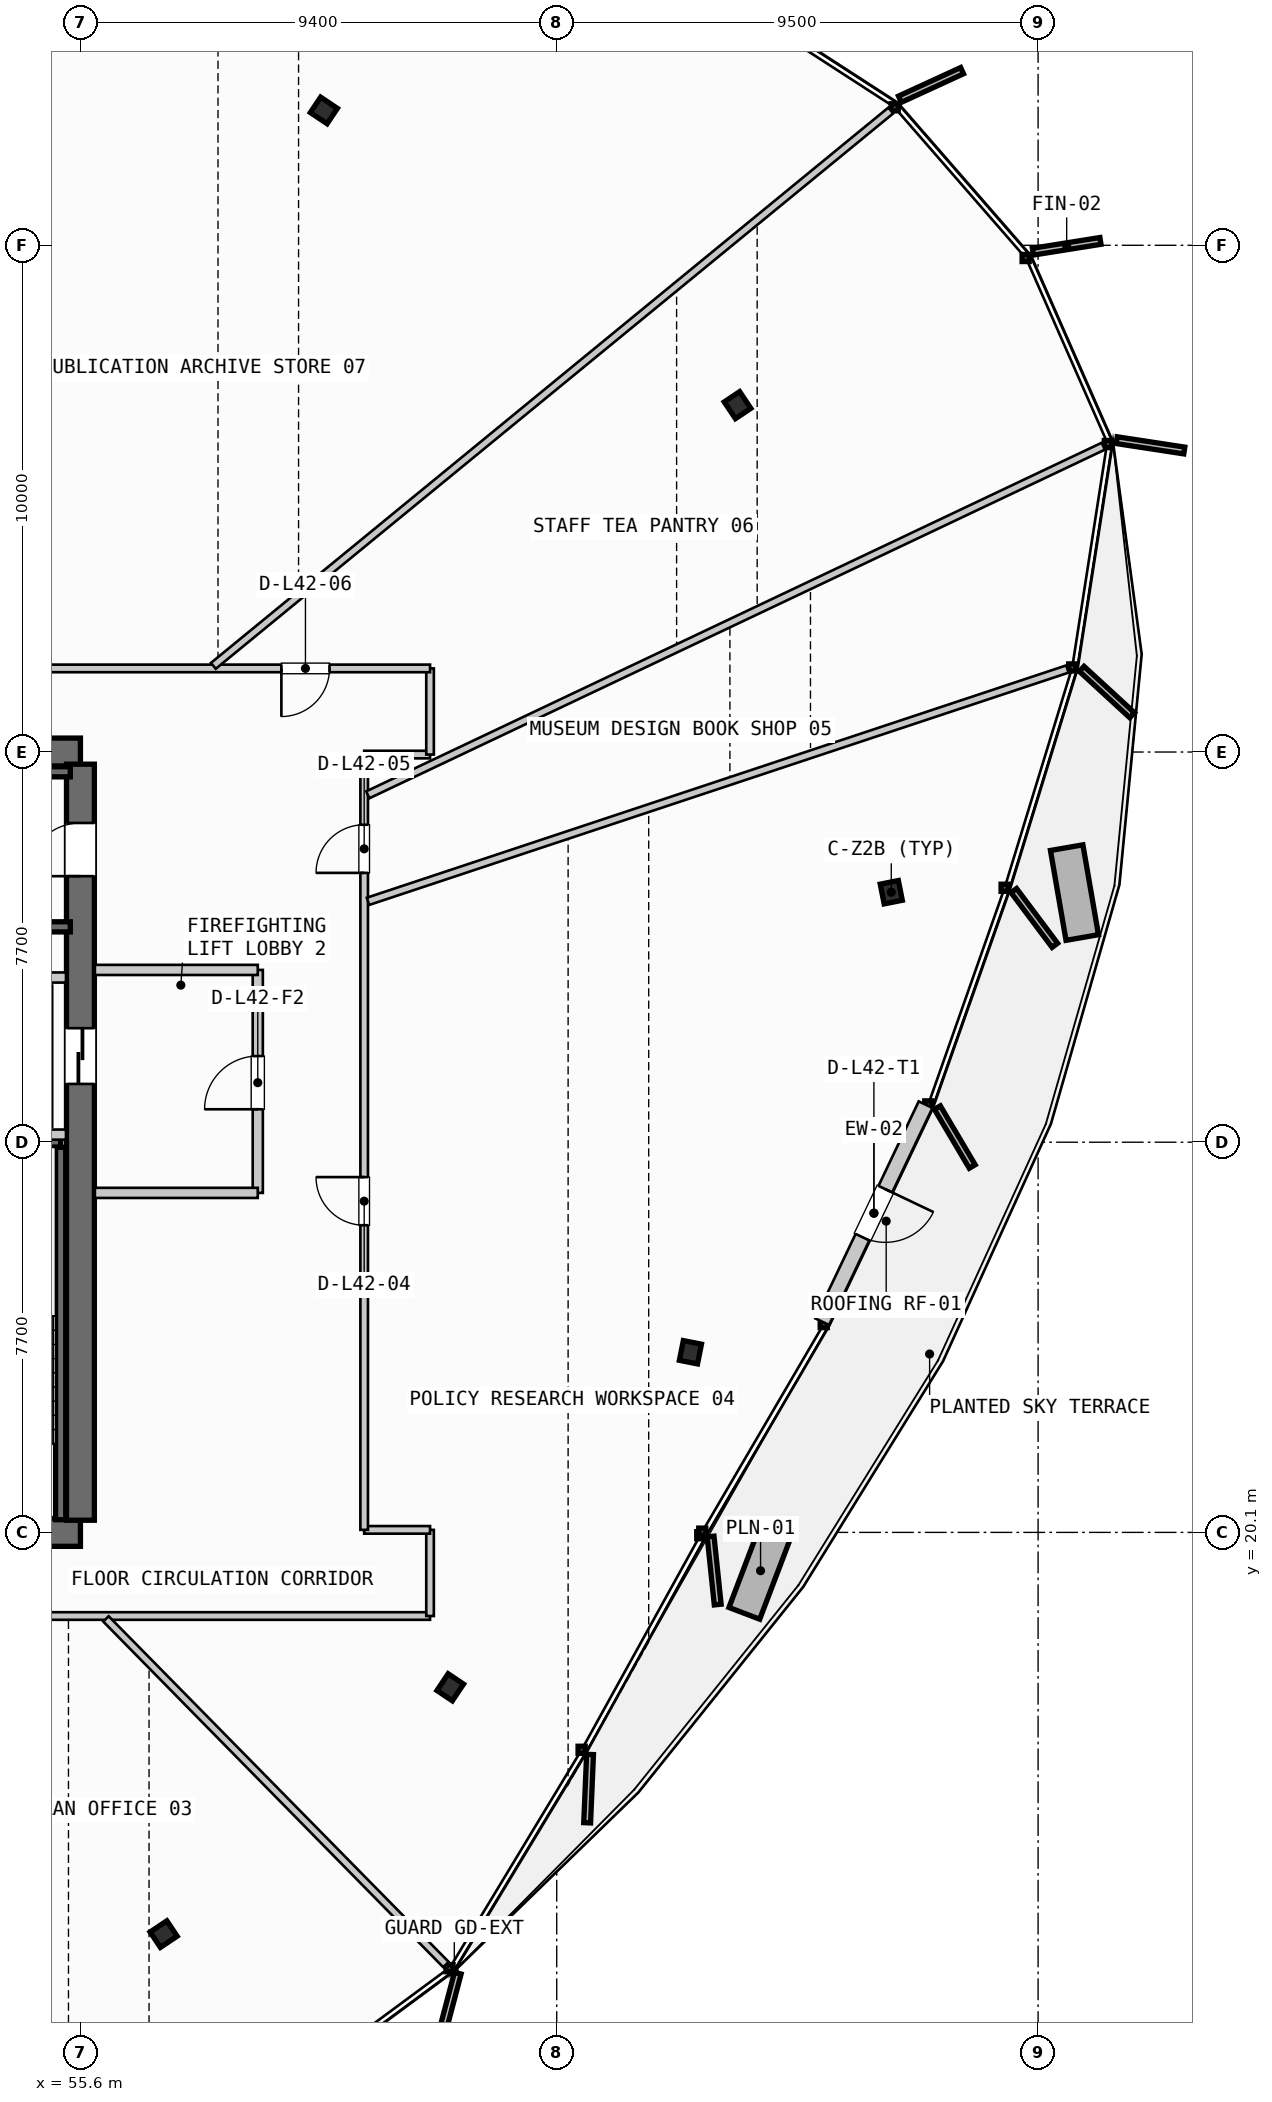
"""IFC4 building model, lengths in metres.
Left out: names, types, materials, properties, quantities, classifications, styles, units other than length and angle.
Written with IfcOpenShell. Run it as: python <this file> out.ifc"""

import sys

from ifc_helpers import new_model, si_unit, direction, frame, frame_2d, origin, origin_2d, place, context, subcontext, project, spatial, rectangle, i_section, extrude, source, transform, mapped, element, fill, save


model = new_model("IFC4")
c1 = context("Model", 3, precision=1e-05, world=origin(), true_north=direction((0.0, 1.0)))
c2 = subcontext(c1, "Body", "Model", "MODEL_VIEW")
j1 = project(units=[si_unit("LENGTHUNIT", "METRE"), si_unit("PLANEANGLEUNIT", "RADIAN")], contexts=[c1])
p1 = place(None, origin())
s1 = spatial("IfcSite", under=j1, at=p1, CompositionType="ELEMENT")
p2 = place(p1, origin())
s2 = spatial("IfcBuilding", under=s1, at=p2, CompositionType="ELEMENT")
p3 = place(p2, frame((0.0, 0.0, 164.3)))
s3 = spatial("IfcBuildingStorey", under=s2, at=p3, CompositionType="ELEMENT", Elevation=164.3)
p4 = place(p3, frame((38.0, 20.1, 0.0), z_axis=(0.0, 0.0, 1.0), x_axis=(1.0, 0.0, 0.0)))
e1 = element("IfcWall", 1, at=p4, inside=s3, PredefinedType="SHEAR", context=c2, shape_type="SweptSolid", body=[
    extrude(rectangle(XDim=17.6, YDim=0.55, at=frame_2d((8.8, 0.0))), origin(), (0.0, 0.0, 1.0), 3.3),
])
p5 = place(p4, frame((1.4, 0.0, 0.0)))
e2 = element("IfcOpeningElement", 2, at=p5, cuts=e1, PredefinedType="OPENING", context=c2, shape_type="SweptSolid", body=[
    extrude(rectangle(XDim=1.05, YDim=2.15, at=frame_2d((0.525, 1.075))), frame((0.0, 0.285, 0.0), z_axis=(0.0, -1.0, 0.0), x_axis=(1.0, 0.0, 0.0)), (0.0, 0.0, 1.0), 0.57),
])
p6 = place(p4, frame((15.15, 0.0, 0.0)))
e3 = element("IfcOpeningElement", 3, at=p6, cuts=e1, PredefinedType="OPENING", context=c2, shape_type="SweptSolid", body=[
    extrude(rectangle(XDim=1.05, YDim=2.15, at=frame_2d((0.525, 1.075))), frame((0.0, 0.285, 0.0), z_axis=(0.0, -1.0, 0.0), x_axis=(1.0, 0.0, 0.0)), (0.0, 0.0, 1.0), 0.57),
])
p7 = place(p4, frame((5.25, 0.0, 0.0)))
e4 = element("IfcOpeningElement", 4, at=p7, cuts=e1, PredefinedType="OPENING", context=c2, shape_type="SweptSolid", body=[
    extrude(rectangle(XDim=0.95, YDim=2.15, at=frame_2d((0.475, 1.075))), frame((0.0, 0.285, 0.0), z_axis=(0.0, -1.0, 0.0), x_axis=(1.0, 0.0, 0.0)), (0.0, 0.0, 1.0), 0.57),
])
p8 = place(p4, frame((11.4, 0.0, 0.0)))
e5 = element("IfcOpeningElement", 5, at=p8, cuts=e1, PredefinedType="OPENING", context=c2, shape_type="SweptSolid", body=[
    extrude(rectangle(XDim=0.95, YDim=2.15, at=frame_2d((0.475, 1.075))), frame((0.0, 0.285, 0.0), z_axis=(0.0, -1.0, 0.0), x_axis=(1.0, 0.0, 0.0)), (0.0, 0.0, 1.0), 0.57),
])
p9 = place(p3, frame((55.6, 35.5, 0.0), z_axis=(0.0, 0.0, 1.0), x_axis=(-1.0, 0.0, 0.0)))
e6 = element("IfcWall", 6, at=p9, inside=s3, PredefinedType="SHEAR", context=c2, shape_type="SweptSolid", body=[
    extrude(rectangle(XDim=17.6, YDim=0.55, at=frame_2d((8.8, 0.0))), origin(), (0.0, 0.0, 1.0), 3.3),
])
p10 = place(p9, frame((8.05, 0.0, 0.0)))
e7 = element("IfcOpeningElement", 7, at=p10, cuts=e6, PredefinedType="OPENING", context=c2, shape_type="SweptSolid", body=[
    extrude(rectangle(XDim=1.5, YDim=2.2, at=frame_2d((0.75, 1.1))), frame((0.0, 0.285, 0.0), z_axis=(0.0, -1.0, 0.0), x_axis=(1.0, 0.0, 0.0)), (0.0, 0.0, 1.0), 0.57),
])
p11 = place(p9, frame((14.95, 0.0, 0.0)))
e8 = element("IfcOpeningElement", 8, at=p11, cuts=e6, PredefinedType="OPENING", context=c2, shape_type="SweptSolid", body=[
    extrude(rectangle(XDim=1.4, YDim=2.3, at=frame_2d((0.7, 1.15))), frame((0.0, 0.285, 0.0), z_axis=(0.0, -1.0, 0.0), x_axis=(1.0, 0.0, 0.0)), (0.0, 0.0, 1.0), 0.57),
])
p12 = place(p9, frame((12.3, 0.0, 0.0)))
e9 = element("IfcOpeningElement", 9, at=p12, cuts=e6, PredefinedType="OPENING", context=c2, shape_type="SweptSolid", body=[
    extrude(rectangle(XDim=0.95, YDim=2.15, at=frame_2d((0.475, 1.075))), frame((0.0, 0.285, 0.0), z_axis=(0.0, -1.0, 0.0), x_axis=(1.0, 0.0, 0.0)), (0.0, 0.0, 1.0), 0.57),
])
p13 = place(p9, frame((10.2, 0.0, 0.0)))
e10 = element("IfcOpeningElement", 10, at=p13, cuts=e6, PredefinedType="OPENING", context=c2, shape_type="SweptSolid", body=[
    extrude(rectangle(XDim=0.9, YDim=2.15, at=frame_2d((0.45, 1.075))), frame((0.0, 0.285, 0.0), z_axis=(0.0, -1.0, 0.0), x_axis=(1.0, 0.0, 0.0)), (0.0, 0.0, 1.0), 0.57),
])
p14 = place(p3, frame((55.6, 20.34, 0.0), z_axis=(0.0, 0.0, 1.0), x_axis=(0.0, 1.0, 0.0)))
e11 = element("IfcWall", 11, at=p14, inside=s3, PredefinedType="SHEAR", context=c2, shape_type="SweptSolid", body=[
    extrude(rectangle(XDim=14.92, YDim=0.55, at=frame_2d((7.46, 0.0))), origin(), (0.0, 0.0, 1.0), 3.3),
])
p15 = place(p14, frame((12.71, 0.0, 0.0)))
e12 = element("IfcOpeningElement", 12, at=p15, cuts=e11, PredefinedType="OPENING", context=c2, shape_type="SweptSolid", body=[
    extrude(rectangle(XDim=1.05, YDim=2.15, at=frame_2d((0.525, 1.075))), frame((0.0, 0.285, 0.0), z_axis=(0.0, -1.0, 0.0), x_axis=(1.0, 0.0, 0.0)), (0.0, 0.0, 1.0), 0.57),
])
p16 = place(p14, frame((8.61, 0.0, 0.0)))
e13 = element("IfcOpeningElement", 13, at=p16, cuts=e11, PredefinedType="OPENING", context=c2, shape_type="SweptSolid", body=[
    extrude(rectangle(XDim=1.1, YDim=2.2, at=frame_2d((0.55, 1.1))), frame((0.0, 0.285, 0.0), z_axis=(0.0, -1.0, 0.0), x_axis=(1.0, 0.0, 0.0)), (0.0, 0.0, 1.0), 0.57),
])
m1 = source(origin(), c2, "Body", "SweptSolid", [
    extrude(i_section(OverallWidth=0.397, OverallDepth=0.365, WebThickness=0.028, FlangeThickness=0.044, FilletRadius=0.015, at=origin_2d()), origin(), (0.0, 0.0, 1.0), 3.3),
])
for number, where, z_axis, x_axis in (
    (14, (71.603, 32.733, 0.0), (0.0, 0.0, 1.0), (0.981, 0.195, 0.0)),
    (15, (68.569, 42.345, 0.0), (0.0, 0.0, 1.0), (0.831, 0.556, 0.0)),
    (16, (60.405, 48.161, 0.0), (0.0, 0.0, 1.0), (0.556, 0.831, 0.0)),
    (17, (57.242, 12.172, 0.0), (0.0, 0.0, 1.0), (0.556, -0.831, 0.0)),
    (18, (62.899, 17.043, 0.0), (0.0, 0.0, 1.0), (0.831, -0.556, 0.0)),
    (19, (67.639, 23.655, 0.0), (0.0, 0.0, 1.0), (0.981, -0.195, 0.0)),
):
    element("IfcColumn", number, at=place(p3, frame(where, z_axis=z_axis, x_axis=x_axis)), inside=s3, PredefinedType="COLUMN", context=c2, shape_type="MappedRepresentation", body=[
        mapped(m1, transform((0.0, 0.0, 0.0), scale=1.0)),
    ])
p17 = place(p3, frame((72.28, 28.542, 0.0), z_axis=(0.0, 0.0, 1.0), x_axis=(-0.429923593324, -0.902865274503, 0.0)))
e20 = element("IfcWall", 20, at=p17, inside=s3, PredefinedType="SOLIDWALL", context=c2, shape_type="SweptSolid", body=[
    extrude(rectangle(XDim=4.745, YDim=0.3, at=frame_2d((2.372, 0.0))), origin(), (0.0, 0.0, 1.0), 2.725),
])
p18 = place(p17, frame((1.847, 0.0, 0.0)))
e21 = element("IfcOpeningElement", 21, at=p18, cuts=e20, PredefinedType="OPENING", context=c2, shape_type="SweptSolid", body=[
    extrude(rectangle(XDim=1.05, YDim=2.2, at=frame_2d((0.525, 1.1))), frame((0.0, 0.16, 0.0), z_axis=(0.0, -1.0, 0.0), x_axis=(1.0, 0.0, 0.0)), (0.0, 0.0, 1.0), 0.32),
])
p19 = place(p3, frame((52.15, 27.8, 0.0), z_axis=(0.0, 0.0, 1.0), x_axis=(1.0, 0.0, 0.0)))
e22 = element("IfcWall", 22, at=p19, inside=s3, PredefinedType="SHEAR", context=c2, shape_type="SweptSolid", body=[
    extrude(rectangle(XDim=3.06, YDim=0.2, at=frame_2d((1.53, 0.0))), origin(), (0.0, 0.0, 1.0), 3.3),
])
for number, where, z_axis, x_axis in (
    (23, (55.21, 27.7, 0.0), (0.0, 0.0, 1.0), (0.0, -1.0, 0.0)),
    (24, (48.05, 35.11, 0.0), (0.0, 0.0, 1.0), (1.0, 0.0, 0.0)),
    (25, (55.4, 32.05, 0.0), (0.0, 0.0, 1.0), (-1.0, 0.0, 0.0)),
):
    element("IfcWall", number, at=place(p3, frame(where, z_axis=z_axis, x_axis=x_axis)), inside=s3, PredefinedType="SHEAR", context=c2, shape_type="SweptSolid", body=[
        extrude(rectangle(XDim=7.35, YDim=0.2, at=frame_2d((3.675, 0.0))), origin(), (0.0, 0.0, 1.0), 3.3),
    ])
for number, where, z_axis, x_axis in (
    (26, (52.45, 27.95, 0.0), (0.0, 0.0, 1.0), (1.0, 0.0, 0.0)),
    (27, (52.45, 31.05, 0.0), (0.0, 0.0, 1.0), (1.0, 0.0, 0.0)),
):
    element("IfcWall", number, at=place(p3, frame(where, z_axis=z_axis, x_axis=x_axis)), inside=s3, PredefinedType="PARTITIONING", context=c2, shape_type="SweptSolid", body=[
        extrude(rectangle(XDim=2.865, YDim=0.2, at=frame_2d((1.433, 0.0))), origin(), (0.0, 0.0, 1.0), 2.28),
    ])
p20 = place(p3, frame((59.1, 26.8, 0.0), z_axis=(0.0, 0.0, 1.0), x_axis=(0.0, 1.0, 0.0)))
e28 = element("IfcWall", 28, at=p20, inside=s3, PredefinedType="PARTITIONING", context=c2, shape_type="SweptSolid", body=[
    extrude(rectangle(XDim=4.4, YDim=0.2, at=frame_2d((2.2, 0.0))), origin(), (0.0, 0.0, 1.0), 2.28),
])
p21 = place(p20, frame((1.65, 0.0, 0.0)))
e29 = element("IfcOpeningElement", 29, at=p21, cuts=e28, PredefinedType="OPENING", context=c2, shape_type="SweptSolid", body=[
    extrude(rectangle(XDim=1.05, YDim=2.15, at=frame_2d((0.525, 1.075))), frame((0.0, 0.11, 0.0), z_axis=(0.0, -1.0, 0.0), x_axis=(1.0, 0.0, 0.0)), (0.0, 0.0, 1.0), 0.22),
])
for number, where, z_axis, x_axis in (
    (30, (55.885, 26.8, 0.0), (0.0, 0.0, 1.0), (1.0, 0.0, 0.0)),
    (31, (55.885, 31.2, 0.0), (0.0, 0.0, 1.0), (1.0, 0.0, 0.0)),
):
    element("IfcWall", number, at=place(p3, frame(where, z_axis=z_axis, x_axis=x_axis)), inside=s3, PredefinedType="PARTITIONING", context=c2, shape_type="SweptSolid", body=[
        extrude(rectangle(XDim=3.215, YDim=0.2, at=frame_2d((1.607, 0.0))), origin(), (0.0, 0.0, 1.0), 2.28),
    ])
p22 = place(p3, frame((31.1, 18.45, 0.0), z_axis=(0.0, 0.0, 1.0), x_axis=(1.0, 0.0, 0.0)))
e32 = element("IfcWall", 32, at=p22, inside=s3, PredefinedType="PARTITIONING", context=c2, shape_type="SweptSolid", body=[
    extrude(rectangle(XDim=31.4, YDim=0.15, at=frame_2d((15.7, 0.0))), origin(), (0.0, 0.0, 1.0), 2.28),
])
p23 = place(p22, frame((7.708, 0.0, 0.0)))
e33 = element("IfcOpeningElement", 33, at=p23, cuts=e32, PredefinedType="OPENING", context=c2, shape_type="SweptSolid", body=[
    extrude(rectangle(XDim=0.95, YDim=2.15, at=frame_2d((0.475, 1.075))), frame((0.0, 0.085, 0.0), z_axis=(0.0, -1.0, 0.0), x_axis=(1.0, 0.0, 0.0)), (0.0, 0.0, 1.0), 0.17),
])
p24 = place(p22, frame((14.956, 0.0, 0.0)))
e34 = element("IfcOpeningElement", 34, at=p24, cuts=e32, PredefinedType="OPENING", context=c2, shape_type="SweptSolid", body=[
    extrude(rectangle(XDim=0.95, YDim=2.15, at=frame_2d((0.475, 1.075))), frame((0.0, 0.085, 0.0), z_axis=(0.0, -1.0, 0.0), x_axis=(1.0, 0.0, 0.0)), (0.0, 0.0, 1.0), 0.17),
])
p25 = place(p22, frame((21.632, 0.0, 0.0)))
e35 = element("IfcOpeningElement", 35, at=p25, cuts=e32, PredefinedType="OPENING", context=c2, shape_type="SweptSolid", body=[
    extrude(rectangle(XDim=0.95, YDim=2.15, at=frame_2d((0.475, 1.075))), frame((0.0, 0.085, 0.0), z_axis=(0.0, -1.0, 0.0), x_axis=(1.0, 0.0, 0.0)), (0.0, 0.0, 1.0), 0.17),
])
p26 = place(p3, frame((62.5, 18.45, 0.0), z_axis=(0.0, 0.0, 1.0), x_axis=(0.0, 1.0, 0.0)))
e36 = element("IfcWall", 36, at=p26, inside=s3, PredefinedType="PARTITIONING", context=c2, shape_type="SweptSolid", body=[
    extrude(rectangle(XDim=1.7, YDim=0.15, at=frame_2d((0.85, 0.0))), origin(), (0.0, 0.0, 1.0), 2.28),
])
p27 = place(p3, frame((62.5, 20.15, 0.0), z_axis=(0.0, 0.0, 1.0), x_axis=(-1.0, 0.0, 0.0)))
e37 = element("IfcWall", 37, at=p27, inside=s3, PredefinedType="PARTITIONING", context=c2, shape_type="SweptSolid", body=[
    extrude(rectangle(XDim=1.3, YDim=0.15, at=frame_2d((0.65, 0.0))), origin(), (0.0, 0.0, 1.0), 2.28),
])
p28 = place(p3, frame((61.2, 20.15, 0.0), z_axis=(0.0, 0.0, 1.0), x_axis=(0.0, 1.0, 0.0)))
e38 = element("IfcWall", 38, at=p28, inside=s3, PredefinedType="PARTITIONING", context=c2, shape_type="SweptSolid", body=[
    extrude(rectangle(XDim=15.3, YDim=0.15, at=frame_2d((7.65, 0.0))), origin(), (0.0, 0.0, 1.0), 2.28),
])
p29 = place(p28, frame((6.012, 0.0, 0.0)))
e39 = element("IfcOpeningElement", 39, at=p29, cuts=e38, PredefinedType="OPENING", context=c2, shape_type="SweptSolid", body=[
    extrude(rectangle(XDim=0.95, YDim=2.15, at=frame_2d((0.475, 1.075))), frame((0.0, 0.085, 0.0), z_axis=(0.0, -1.0, 0.0), x_axis=(1.0, 0.0, 0.0)), (0.0, 0.0, 1.0), 0.17),
])
p30 = place(p28, frame((12.965, 0.0, 0.0)))
e40 = element("IfcOpeningElement", 40, at=p30, cuts=e38, PredefinedType="OPENING", context=c2, shape_type="SweptSolid", body=[
    extrude(rectangle(XDim=0.95, YDim=2.15, at=frame_2d((0.475, 1.075))), frame((0.0, 0.085, 0.0), z_axis=(0.0, -1.0, 0.0), x_axis=(1.0, 0.0, 0.0)), (0.0, 0.0, 1.0), 0.17),
])
p31 = place(p3, frame((61.2, 35.45, 0.0), z_axis=(0.0, 0.0, 1.0), x_axis=(1.0, 0.0, 0.0)))
e41 = element("IfcWall", 41, at=p31, inside=s3, PredefinedType="PARTITIONING", context=c2, shape_type="SweptSolid", body=[
    extrude(rectangle(XDim=1.3, YDim=0.15, at=frame_2d((0.65, 0.0))), origin(), (0.0, 0.0, 1.0), 2.28),
])
p32 = place(p3, frame((62.5, 35.45, 0.0), z_axis=(0.0, 0.0, 1.0), x_axis=(0.0, 1.0, 0.0)))
e42 = element("IfcWall", 42, at=p32, inside=s3, PredefinedType="PARTITIONING", context=c2, shape_type="SweptSolid", body=[
    extrude(rectangle(XDim=1.7, YDim=0.15, at=frame_2d((0.85, 0.0))), origin(), (0.0, 0.0, 1.0), 2.28),
])
p33 = place(p3, frame((62.5, 37.15, 0.0), z_axis=(0.0, 0.0, 1.0), x_axis=(-1.0, 0.0, 0.0)))
e43 = element("IfcWall", 43, at=p33, inside=s3, PredefinedType="PARTITIONING", context=c2, shape_type="SweptSolid", body=[
    extrude(rectangle(XDim=31.4, YDim=0.15, at=frame_2d((15.7, 0.0))), origin(), (0.0, 0.0, 1.0), 2.28),
])
p34 = place(p33, frame((1.984, 0.0, 0.0)))
e44 = element("IfcOpeningElement", 44, at=p34, cuts=e43, PredefinedType="OPENING", context=c2, shape_type="SweptSolid", body=[
    extrude(rectangle(XDim=0.95, YDim=2.15, at=frame_2d((0.475, 1.075))), frame((0.0, 0.085, 0.0), z_axis=(0.0, -1.0, 0.0), x_axis=(1.0, 0.0, 0.0)), (0.0, 0.0, 1.0), 0.17),
])
p35 = place(p33, frame((8.15, 0.0, 0.0)))
e45 = element("IfcOpeningElement", 45, at=p35, cuts=e43, PredefinedType="OPENING", context=c2, shape_type="SweptSolid", body=[
    extrude(rectangle(XDim=0.95, YDim=2.15, at=frame_2d((0.475, 1.075))), frame((0.0, 0.085, 0.0), z_axis=(0.0, -1.0, 0.0), x_axis=(1.0, 0.0, 0.0)), (0.0, 0.0, 1.0), 0.17),
])
p36 = place(p33, frame((18.562, 0.0, 0.0)))
e46 = element("IfcOpeningElement", 46, at=p36, cuts=e43, PredefinedType="OPENING", context=c2, shape_type="SweptSolid", body=[
    extrude(rectangle(XDim=0.95, YDim=2.15, at=frame_2d((0.475, 1.075))), frame((0.0, 0.085, 0.0), z_axis=(0.0, -1.0, 0.0), x_axis=(1.0, 0.0, 0.0)), (0.0, 0.0, 1.0), 0.17),
])
p37 = place(p3, frame((56.104, 18.393, 0.0), z_axis=(0.0, 0.0, 1.0), x_axis=(0.701253006268, -0.712912491965, 0.0)))
e47 = element("IfcWall", 47, at=p37, inside=s3, PredefinedType="PARTITIONING", context=c2, shape_type="SweptSolid", body=[
    extrude(rectangle(XDim=9.569, YDim=0.15, at=frame_2d((4.785, 0.0))), origin(), (0.0, 0.0, 1.0), 2.28),
])
p38 = place(p3, frame((61.276, 32.554, 0.0), z_axis=(0.0, 0.0, 1.0), x_axis=(0.949028521905, 0.315190203863, 0.0)))
e48 = element("IfcWall", 48, at=p38, inside=s3, PredefinedType="PARTITIONING", context=c2, shape_type="SweptSolid", body=[
    extrude(rectangle(XDim=14.544, YDim=0.15, at=frame_2d((7.272, 0.0))), origin(), (0.0, 0.0, 1.0), 2.28),
])
p39 = place(p3, frame((61.272, 34.656, 0.0), z_axis=(0.0, 0.0, 1.0), x_axis=(0.903643729572, 0.428284963552, 0.0)))
e49 = element("IfcWall", 49, at=p39, inside=s3, PredefinedType="PARTITIONING", context=c2, shape_type="SweptSolid", body=[
    extrude(rectangle(XDim=16.062, YDim=0.15, at=frame_2d((8.031, 0.0))), origin(), (0.0, 0.0, 1.0), 2.28),
])
p40 = place(p3, frame((58.224, 37.201, 0.0), z_axis=(0.0, 0.0, 1.0), x_axis=(0.773366110677, 0.633959666585, 0.0)))
e50 = element("IfcWall", 50, at=p40, inside=s3, PredefinedType="PARTITIONING", context=c2, shape_type="SweptSolid", body=[
    extrude(rectangle(XDim=17.287, YDim=0.15, at=frame_2d((8.644, 0.0))), origin(), (0.0, 0.0, 1.0), 2.28),
])
m2 = source(origin(), c2, "Body", "SweptSolid", [
    extrude(rectangle(XDim=1.05, YDim=2.2, at=frame_2d((0.525, 1.1))), frame((0.0, 0.025, 0.0), z_axis=(0.0, -1.0, 0.0), x_axis=(1.0, 0.0, 0.0)), (0.0, 0.0, 1.0), 0.05),
])
p41 = place(p18, origin())
e51 = element("IfcDoor", 51, at=p41, inside=s3, OperationType="SINGLE_SWING_LEFT", PredefinedType="DOOR", context=c2, shape_type="MappedRepresentation", body=[
    mapped(m2, transform((0.0, 0.0, 0.0), scale=1.0)),
])
fill(e21, e51)
m3 = source(origin(), c2, "Body", "SweptSolid", [
    extrude(rectangle(XDim=1.05, YDim=2.15, at=frame_2d((0.525, 1.075))), frame((0.0, 0.025, 0.0), z_axis=(0.0, -1.0, 0.0), x_axis=(1.0, 0.0, 0.0)), (0.0, 0.0, 1.0), 0.05),
])
p42 = place(p15, origin())
e52 = element("IfcDoor", 52, at=p42, inside=s3, OperationType="SINGLE_SWING_LEFT", PredefinedType="DOOR", context=c2, shape_type="MappedRepresentation", body=[
    mapped(m3, transform((0.0, 0.0, 0.0), scale=1.0)),
])
fill(e12, e52)
m4 = source(origin(), c2, "Body", "SweptSolid", [
    extrude(rectangle(XDim=1.1, YDim=2.2, at=frame_2d((0.55, 1.1))), frame((0.0, 0.025, 0.0), z_axis=(0.0, -1.0, 0.0), x_axis=(1.0, 0.0, 0.0)), (0.0, 0.0, 1.0), 0.05),
])
p43 = place(p16, origin())
e53 = element("IfcDoor", 53, at=p43, inside=s3, OperationType="SLIDING_TO_RIGHT", PredefinedType="DOOR", context=c2, shape_type="MappedRepresentation", body=[
    mapped(m4, transform((0.0, 0.0, 0.0), scale=1.0)),
])
fill(e13, e53)
p44 = place(p21, origin())
e54 = element("IfcDoor", 54, at=p44, inside=s3, OperationType="SINGLE_SWING_LEFT", PredefinedType="DOOR", context=c2, shape_type="MappedRepresentation", body=[
    mapped(m3, transform((0.0, 0.0, 0.0), scale=1.0)),
])
fill(e29, e54)
m5 = source(origin(), c2, "Body", "SweptSolid", [
    extrude(rectangle(XDim=0.95, YDim=2.15, at=frame_2d((0.475, 1.075))), frame((0.0, 0.025, 0.0), z_axis=(0.0, -1.0, 0.0), x_axis=(1.0, 0.0, 0.0)), (0.0, 0.0, 1.0), 0.05),
])
p45 = place(p29, origin())
e55 = element("IfcDoor", 55, at=p45, inside=s3, OperationType="SINGLE_SWING_RIGHT", PredefinedType="DOOR", context=c2, shape_type="MappedRepresentation", body=[
    mapped(m5, transform((0.0, 0.0, 0.0), scale=1.0)),
])
fill(e39, e55)
p46 = place(p30, origin())
e56 = element("IfcDoor", 56, at=p46, inside=s3, OperationType="SINGLE_SWING_LEFT", PredefinedType="DOOR", context=c2, shape_type="MappedRepresentation", body=[
    mapped(m5, transform((0.0, 0.0, 0.0), scale=1.0)),
])
fill(e40, e56)
p47 = place(p34, origin())
e57 = element("IfcDoor", 57, at=p47, inside=s3, OperationType="SINGLE_SWING_RIGHT", PredefinedType="DOOR", context=c2, shape_type="MappedRepresentation", body=[
    mapped(m5, transform((0.0, 0.0, 0.0), scale=1.0)),
])
fill(e44, e57)
save(model, sys.argv[1])
